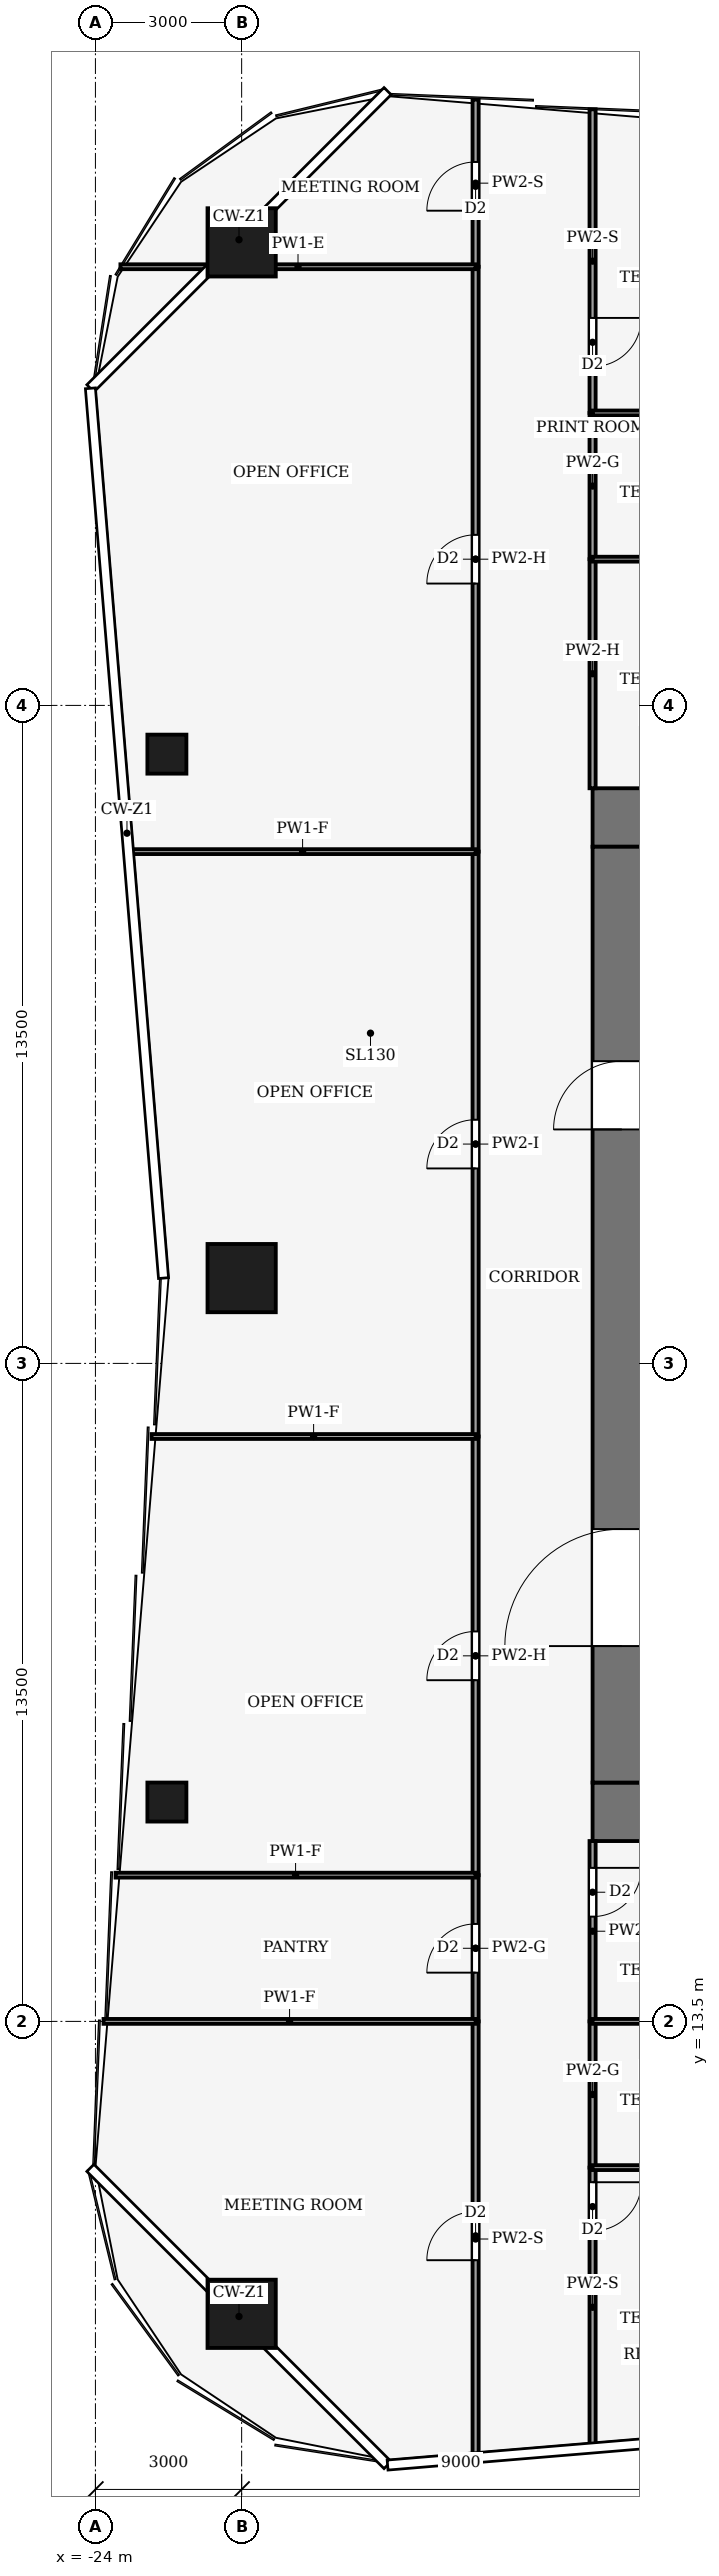
"""IFC4 building model, lengths in metres.
Left out: names, types, materials, properties, quantities, classifications, styles, units other than length and angle.
Written with IfcOpenShell. Run it as: python <this file> out.ifc"""

import sys

from ifc_helpers import new_model, si_unit, direction, frame, frame_2d, origin, origin_2d, place, context, subcontext, project, spatial, rectangle, hollow_rectangle, extrude, element, fill, save


model = new_model("IFC4")
c1 = context("Model", 3, precision=1e-05, world=origin(), true_north=direction((0.0, 1.0)))
c2 = subcontext(c1, "Body", "Model", "MODEL_VIEW")
j1 = project(units=[si_unit("LENGTHUNIT", "METRE"), si_unit("PLANEANGLEUNIT", "RADIAN")], contexts=[c1])
p1 = place(None, origin())
s1 = spatial("IfcSite", under=j1, at=p1, CompositionType="ELEMENT")
p2 = place(p1, origin())
s2 = spatial("IfcBuilding", under=s1, at=p2, CompositionType="ELEMENT")
p3 = place(p2, frame((0.0, 0.0, 86.0)))
s3 = spatial("IfcBuildingStorey", under=s2, at=p3, CompositionType="ELEMENT", Elevation=86.0)
for number, where, z_axis, x_axis in (
    (1, (-13.8, 17.8, -0.13), (0.0, 0.0, 1.0), (1.0, 0.0, 0.0)),
    (2, (-13.8, 38.2, -0.13), (0.0, 0.0, 1.0), (1.0, 0.0, 0.0)),
):
    element("IfcWall", number, at=place(p3, frame(where, z_axis=z_axis, x_axis=x_axis)), inside=s3, PredefinedType="SHEAR", context=c2, shape_type="SweptSolid", body=[
        extrude(rectangle(XDim=27.6, YDim=1.2, at=frame_2d((13.8, 0.0))), origin(), (0.0, 0.0, 1.0), 4.0),
    ])
p4 = place(p3, frame((-13.2, 18.4, -0.13), z_axis=(0.0, 0.0, 1.0), x_axis=(0.0, 1.0, 0.0)))
e3 = element("IfcWall", 3, at=p4, inside=s3, PredefinedType="SHEAR", context=c2, shape_type="SweptSolid", body=[
    extrude(rectangle(XDim=19.2, YDim=1.2, at=frame_2d((9.6, 0.0))), origin(), (0.0, 0.0, 1.0), 4.0),
])
p5 = place(p4, frame((2.8, 0.0, 0.13)))
e4 = element("IfcOpeningElement", 4, at=p5, cuts=e3, PredefinedType="OPENING", context=c2, shape_type="SweptSolid", body=[
    extrude(rectangle(XDim=2.4, YDim=2.4, at=frame_2d((1.2, 1.2))), frame((0.0, 0.61, 0.0), z_axis=(0.0, -1.0, 0.0), x_axis=(1.0, 0.0, 0.0)), (0.0, 0.0, 1.0), 1.22),
])
p6 = place(p4, frame((13.4, 0.0, 0.13)))
e5 = element("IfcOpeningElement", 5, at=p6, cuts=e3, PredefinedType="OPENING", context=c2, shape_type="SweptSolid", body=[
    extrude(rectangle(XDim=1.4, YDim=2.2, at=frame_2d((0.7, 1.1))), frame((0.0, 0.61, 0.0), z_axis=(0.0, -1.0, 0.0), x_axis=(1.0, 0.0, 0.0)), (0.0, 0.0, 1.0), 1.22),
])
for number, where, z_axis, x_axis in (
    (6, (-21.0, 50.0, 0.0), (0.0, 0.0, 1.0), (1.0, 0.0, 0.0)),
    (7, (-21.0, 7.5, 0.0), (0.0, 0.0, 1.0), (1.0, 0.0, 0.0)),
    (8, (-21.0, 28.75, 0.0), (0.0, 0.0, 1.0), (1.0, 0.0, 0.0)),
):
    element("IfcColumn", number, at=place(p3, frame(where, z_axis=z_axis, x_axis=x_axis)), inside=s3, PredefinedType="COLUMN", context=c2, shape_type="SweptSolid", body=[
        extrude(hollow_rectangle(XDim=1.4, YDim=1.4, WallThickness=0.08, at=origin_2d()), origin(), (0.0, 0.0, 1.0), 4.0),
    ])
for number, where, z_axis, x_axis in (
    (9, (-22.534, 18.0, 0.0), (0.0, 0.0, 1.0), (1.0, 0.0, 0.0)),
    (10, (-22.534, 39.5, 0.0), (0.0, 0.0, 1.0), (1.0, 0.0, 0.0)),
):
    element("IfcColumn", number, at=place(p3, frame(where, z_axis=z_axis, x_axis=x_axis)), inside=s3, PredefinedType="COLUMN", context=c2, shape_type="SweptSolid", body=[
        extrude(hollow_rectangle(XDim=0.8, YDim=0.8, WallThickness=0.04, at=origin_2d()), origin(), (0.0, 0.0, 1.0), 4.0),
    ])
p7 = place(p3, frame((-16.2, 4.57, 0.0), z_axis=(0.0, 0.0, 1.0), x_axis=(0.0, 1.0, 0.0)))
e11 = element("IfcWall", 11, at=p7, inside=s3, PredefinedType="PARTITIONING", context=c2, shape_type="SweptSolid", body=[
    extrude(rectangle(XDim=8.93, YDim=0.125, at=frame_2d((4.465, 0.0))), origin(), (0.0, 0.0, 1.0), 3.04),
])
p8 = place(p7, frame((4.03, 0.0, 0.0)))
e12 = element("IfcOpeningElement", 12, at=p8, cuts=e11, PredefinedType="OPENING", context=c2, shape_type="SweptSolid", body=[
    extrude(rectangle(XDim=1.0, YDim=2.1, at=frame_2d((0.5, 1.05))), frame((0.0, 0.073, 0.0), z_axis=(0.0, -1.0, 0.0), x_axis=(1.0, 0.0, 0.0)), (0.0, 0.0, 1.0), 0.145),
])
p9 = place(p3, frame((-16.2, 13.5, 0.0), z_axis=(0.0, 0.0, 1.0), x_axis=(0.0, 1.0, 0.0)))
e13 = element("IfcWall", 13, at=p9, inside=s3, PredefinedType="PARTITIONING", context=c2, shape_type="SweptSolid", body=[
    extrude(rectangle(XDim=3.0, YDim=0.125, at=frame_2d((1.5, 0.0))), origin(), (0.0, 0.0, 1.0), 3.87),
])
p10 = place(p9, frame((1.0, 0.0, 0.0)))
e14 = element("IfcOpeningElement", 14, at=p10, cuts=e13, PredefinedType="OPENING", context=c2, shape_type="SweptSolid", body=[
    extrude(rectangle(XDim=1.0, YDim=2.1, at=frame_2d((0.5, 1.05))), frame((0.0, 0.073, 0.0), z_axis=(0.0, -1.0, 0.0), x_axis=(1.0, 0.0, 0.0)), (0.0, 0.0, 1.0), 0.145),
])
p11 = place(p3, frame((-16.2, 16.5, 0.0), z_axis=(0.0, 0.0, 1.0), x_axis=(0.0, 1.0, 0.0)))
e15 = element("IfcWall", 15, at=p11, inside=s3, PredefinedType="PARTITIONING", context=c2, shape_type="SweptSolid", body=[
    extrude(rectangle(XDim=9.0, YDim=0.125, at=frame_2d((4.5, 0.0))), origin(), (0.0, 0.0, 1.0), 3.14),
])
p12 = place(p11, frame((4.0, 0.0, 0.0)))
e16 = element("IfcOpeningElement", 16, at=p12, cuts=e15, PredefinedType="OPENING", context=c2, shape_type="SweptSolid", body=[
    extrude(rectangle(XDim=1.0, YDim=2.1, at=frame_2d((0.5, 1.05))), frame((0.0, 0.073, 0.0), z_axis=(0.0, -1.0, 0.0), x_axis=(1.0, 0.0, 0.0)), (0.0, 0.0, 1.0), 0.145),
])
p13 = place(p3, frame((-16.2, 25.5, 0.0), z_axis=(0.0, 0.0, 1.0), x_axis=(0.0, 1.0, 0.0)))
e17 = element("IfcWall", 17, at=p13, inside=s3, PredefinedType="PARTITIONING", context=c2, shape_type="SweptSolid", body=[
    extrude(rectangle(XDim=12.0, YDim=0.125, at=frame_2d((6.0, 0.0))), origin(), (0.0, 0.0, 1.0), 3.48),
])
p14 = place(p13, frame((5.5, 0.0, 0.0)))
e18 = element("IfcOpeningElement", 18, at=p14, cuts=e17, PredefinedType="OPENING", context=c2, shape_type="SweptSolid", body=[
    extrude(rectangle(XDim=1.0, YDim=2.1, at=frame_2d((0.5, 1.05))), frame((0.0, 0.073, 0.0), z_axis=(0.0, -1.0, 0.0), x_axis=(1.0, 0.0, 0.0)), (0.0, 0.0, 1.0), 0.145),
])
p15 = place(p3, frame((-16.2, 37.5, 0.0), z_axis=(0.0, 0.0, 1.0), x_axis=(0.0, 1.0, 0.0)))
e19 = element("IfcWall", 19, at=p15, inside=s3, PredefinedType="PARTITIONING", context=c2, shape_type="SweptSolid", body=[
    extrude(rectangle(XDim=12.0, YDim=0.125, at=frame_2d((6.0, 0.0))), origin(), (0.0, 0.0, 1.0), 3.14),
])
p16 = place(p15, frame((5.5, 0.0, 0.0)))
e20 = element("IfcOpeningElement", 20, at=p16, cuts=e19, PredefinedType="OPENING", context=c2, shape_type="SweptSolid", body=[
    extrude(rectangle(XDim=1.0, YDim=2.1, at=frame_2d((0.5, 1.05))), frame((0.0, 0.073, 0.0), z_axis=(0.0, -1.0, 0.0), x_axis=(1.0, 0.0, 0.0)), (0.0, 0.0, 1.0), 0.145),
])
p17 = place(p3, frame((-16.2, 49.5, 0.0), z_axis=(0.0, 0.0, 1.0), x_axis=(0.0, 1.0, 0.0)))
e21 = element("IfcWall", 21, at=p17, inside=s3, PredefinedType="PARTITIONING", context=c2, shape_type="SweptSolid", body=[
    extrude(rectangle(XDim=3.43, YDim=0.125, at=frame_2d((1.715, 0.0))), origin(), (0.0, 0.0, 1.0), 3.04),
])
p18 = place(p17, frame((1.15, 0.0, 0.0)))
e22 = element("IfcOpeningElement", 22, at=p18, cuts=e21, PredefinedType="OPENING", context=c2, shape_type="SweptSolid", body=[
    extrude(rectangle(XDim=1.0, YDim=2.1, at=frame_2d((0.5, 1.05))), frame((0.0, 0.073, 0.0), z_axis=(0.0, -1.0, 0.0), x_axis=(1.0, 0.0, 0.0)), (0.0, 0.0, 1.0), 0.145),
])
p19 = place(p3, frame((-13.8, 10.5, 0.0), z_axis=(0.0, 0.0, 1.0), x_axis=(0.0, -1.0, 0.0)))
e23 = element("IfcWall", 23, at=p19, inside=s3, PredefinedType="PARTITIONING", context=c2, shape_type="SweptSolid", body=[
    extrude(rectangle(XDim=5.73, YDim=0.125, at=frame_2d((2.865, 0.0))), origin(), (0.0, 0.0, 1.0), 3.04),
])
p20 = place(p19, frame((0.3, 0.0, 0.0)))
e24 = element("IfcOpeningElement", 24, at=p20, cuts=e23, PredefinedType="OPENING", context=c2, shape_type="SweptSolid", body=[
    extrude(rectangle(XDim=1.0, YDim=2.1, at=frame_2d((0.5, 1.05))), frame((0.0, 0.073, 0.0), z_axis=(0.0, -1.0, 0.0), x_axis=(1.0, 0.0, 0.0)), (0.0, 0.0, 1.0), 0.145),
])
p21 = place(p3, frame((-13.8, 10.5, 0.0), z_axis=(0.0, 0.0, 1.0), x_axis=(0.0, 1.0, 0.0)))
e25 = element("IfcWall", 25, at=p21, inside=s3, PredefinedType="PARTITIONING", context=c2, shape_type="SweptSolid", body=[
    extrude(rectangle(XDim=3.0, YDim=0.125, at=frame_2d((1.5, 0.0))), origin(), (0.0, 0.0, 1.0), 3.87),
])
p22 = place(p3, frame((-13.8, 17.2, 0.0), z_axis=(0.0, 0.0, 1.0), x_axis=(0.0, -1.0, 0.0)))
e26 = element("IfcWall", 26, at=p22, inside=s3, PredefinedType="PARTITIONING", context=c2, shape_type="SweptSolid", body=[
    extrude(rectangle(XDim=3.7, YDim=0.125, at=frame_2d((1.85, 0.0))), origin(), (0.0, 0.0, 1.0), 3.14),
])
p23 = place(p22, frame((0.55, 0.0, 0.0)))
e27 = element("IfcOpeningElement", 27, at=p23, cuts=e26, PredefinedType="OPENING", context=c2, shape_type="SweptSolid", body=[
    extrude(rectangle(XDim=1.0, YDim=2.1, at=frame_2d((0.5, 1.05))), frame((0.0, 0.073, 0.0), z_axis=(0.0, -1.0, 0.0), x_axis=(1.0, 0.0, 0.0)), (0.0, 0.0, 1.0), 0.145),
])
p24 = place(p3, frame((-13.8, 38.8, 0.0), z_axis=(0.0, 0.0, 1.0), x_axis=(0.0, 1.0, 0.0)))
e28 = element("IfcWall", 28, at=p24, inside=s3, PredefinedType="PARTITIONING", context=c2, shape_type="SweptSolid", body=[
    extrude(rectangle(XDim=4.7, YDim=0.125, at=frame_2d((2.35, 0.0))), origin(), (0.0, 0.0, 1.0), 3.14),
])
p25 = place(p3, frame((-13.8, 43.5, 0.0), z_axis=(0.0, 0.0, 1.0), x_axis=(0.0, 1.0, 0.0)))
e29 = element("IfcWall", 29, at=p25, inside=s3, PredefinedType="PARTITIONING", context=c2, shape_type="SweptSolid", body=[
    extrude(rectangle(XDim=3.0, YDim=0.125, at=frame_2d((1.5, 0.0))), origin(), (0.0, 0.0, 1.0), 3.87),
])
p26 = place(p3, frame((-13.8, 52.73, 0.0), z_axis=(0.0, 0.0, 1.0), x_axis=(0.0, -1.0, 0.0)))
e30 = element("IfcWall", 30, at=p26, inside=s3, PredefinedType="PARTITIONING", context=c2, shape_type="SweptSolid", body=[
    extrude(rectangle(XDim=6.23, YDim=0.125, at=frame_2d((3.115, 0.0))), origin(), (0.0, 0.0, 1.0), 3.04),
])
p27 = place(p26, frame((4.28, 0.0, 0.0)))
e31 = element("IfcOpeningElement", 31, at=p27, cuts=e30, PredefinedType="OPENING", context=c2, shape_type="SweptSolid", body=[
    extrude(rectangle(XDim=1.0, YDim=2.1, at=frame_2d((0.5, 1.05))), frame((0.0, 0.073, 0.0), z_axis=(0.0, -1.0, 0.0), x_axis=(1.0, 0.0, 0.0)), (0.0, 0.0, 1.0), 0.145),
])
p28 = place(p3, frame((-16.2, 13.5, 0.0), z_axis=(0.0, 0.0, 1.0), x_axis=(-1.0, 0.0, 0.0)))
e32 = element("IfcWall", 32, at=p28, inside=s3, PredefinedType="PARTITIONING", context=c2, shape_type="SweptSolid", body=[
    extrude(rectangle(XDim=7.634, YDim=0.1, at=frame_2d((3.817, 0.0))), origin(), (0.0, 0.0, 1.0), 3.04),
])
p29 = place(p3, frame((-16.2, 16.5, 0.0), z_axis=(0.0, 0.0, 1.0), x_axis=(-1.0, 0.0, 0.0)))
e33 = element("IfcWall", 33, at=p29, inside=s3, PredefinedType="PARTITIONING", context=c2, shape_type="SweptSolid", body=[
    extrude(rectangle(XDim=7.387, YDim=0.1, at=frame_2d((3.693, 0.0))), origin(), (0.0, 0.0, 1.0), 3.04),
])
p30 = place(p3, frame((-16.2, 25.5, 0.0), z_axis=(0.0, 0.0, 1.0), x_axis=(-1.0, 0.0, 0.0)))
e34 = element("IfcWall", 34, at=p30, inside=s3, PredefinedType="PARTITIONING", context=c2, shape_type="SweptSolid", body=[
    extrude(rectangle(XDim=6.647, YDim=0.1, at=frame_2d((3.324, 0.0))), origin(), (0.0, 0.0, 1.0), 3.04),
])
p31 = place(p3, frame((-16.2, 37.5, 0.0), z_axis=(0.0, 0.0, 1.0), x_axis=(-1.0, 0.0, 0.0)))
e35 = element("IfcWall", 35, at=p31, inside=s3, PredefinedType="PARTITIONING", context=c2, shape_type="SweptSolid", body=[
    extrude(rectangle(XDim=7.099, YDim=0.1, at=frame_2d((3.55, 0.0))), origin(), (0.0, 0.0, 1.0), 3.04),
])
p32 = place(p3, frame((-16.2, 49.5, 0.0), z_axis=(0.0, 0.0, 1.0), x_axis=(-1.0, 0.0, 0.0)))
e36 = element("IfcWall", 36, at=p32, inside=s3, PredefinedType="PARTITIONING", context=c2, shape_type="SweptSolid", body=[
    extrude(rectangle(XDim=7.287, YDim=0.1, at=frame_2d((3.644, 0.0))), origin(), (0.0, 0.0, 1.0), 3.34),
])
p33 = place(p3, frame((-13.8, 10.5, 0.0), z_axis=(0.0, 0.0, 1.0), x_axis=(1.0, 0.0, 0.0)))
e37 = element("IfcWall", 37, at=p33, inside=s3, PredefinedType="PARTITIONING", context=c2, shape_type="SweptSolid", body=[
    extrude(rectangle(XDim=3.3, YDim=0.1, at=frame_2d((1.65, 0.0))), origin(), (0.0, 0.0, 1.0), 3.44),
])
p34 = place(p33, frame((1.95, 0.0, 0.0)))
e38 = element("IfcOpeningElement", 38, at=p34, cuts=e37, PredefinedType="OPENING", context=c2, shape_type="SweptSolid", body=[
    extrude(rectangle(XDim=1.0, YDim=2.1, at=frame_2d((0.5, 1.05))), frame((0.0, 0.06, 0.0), z_axis=(0.0, -1.0, 0.0), x_axis=(1.0, 0.0, 0.0)), (0.0, 0.0, 1.0), 0.12),
])
p35 = place(p3, frame((-10.5, 13.5, 0.0), z_axis=(0.0, 0.0, 1.0), x_axis=(-1.0, 0.0, 0.0)))
e39 = element("IfcWall", 39, at=p35, inside=s3, PredefinedType="PARTITIONING", context=c2, shape_type="SweptSolid", body=[
    extrude(rectangle(XDim=3.3, YDim=0.1, at=frame_2d((1.65, 0.0))), origin(), (0.0, 0.0, 1.0), 3.44),
])
p36 = place(p3, frame((-10.5, 43.5, 0.0), z_axis=(0.0, 0.0, 1.0), x_axis=(-1.0, 0.0, 0.0)))
e40 = element("IfcWall", 40, at=p36, inside=s3, PredefinedType="PARTITIONING", context=c2, shape_type="SweptSolid", body=[
    extrude(rectangle(XDim=3.3, YDim=0.1, at=frame_2d((1.65, 0.0))), origin(), (0.0, 0.0, 1.0), 3.39),
])
p37 = place(p36, frame((1.15, 0.0, 0.0)))
e41 = element("IfcOpeningElement", 41, at=p37, cuts=e40, PredefinedType="OPENING", context=c2, shape_type="SweptSolid", body=[
    extrude(rectangle(XDim=1.0, YDim=2.1, at=frame_2d((0.5, 1.05))), frame((0.0, 0.06, 0.0), z_axis=(0.0, -1.0, 0.0), x_axis=(1.0, 0.0, 0.0)), (0.0, 0.0, 1.0), 0.12),
])
p38 = place(p3, frame((-10.5, 46.5, 0.0), z_axis=(0.0, 0.0, 1.0), x_axis=(-1.0, 0.0, 0.0)))
e42 = element("IfcWall", 42, at=p38, inside=s3, PredefinedType="PARTITIONING", context=c2, shape_type="SweptSolid", body=[
    extrude(rectangle(XDim=3.3, YDim=0.1, at=frame_2d((1.65, 0.0))), origin(), (0.0, 0.0, 1.0), 3.39),
])
p39 = place(p38, frame((0.35, 0.0, 0.0)))
e43 = element("IfcOpeningElement", 43, at=p39, cuts=e42, PredefinedType="OPENING", context=c2, shape_type="SweptSolid", body=[
    extrude(rectangle(XDim=1.0, YDim=2.1, at=frame_2d((0.5, 1.05))), frame((0.0, 0.06, 0.0), z_axis=(0.0, -1.0, 0.0), x_axis=(1.0, 0.0, 0.0)), (0.0, 0.0, 1.0), 0.12),
])
p40 = place(p5, origin())
e44 = element("IfcDoor", 44, at=p40, inside=s3, OperationType="DOUBLE_DOOR_SINGLE_SWING", PredefinedType="DOOR", context=c2, shape_type="SweptSolid", body=[
    extrude(rectangle(XDim=2.4, YDim=2.4, at=frame_2d((1.2, 1.2))), frame((0.0, 0.025, 0.0), z_axis=(0.0, -1.0, 0.0), x_axis=(1.0, 0.0, 0.0)), (0.0, 0.0, 1.0), 0.05),
])
fill(e4, e44)
p41 = place(p6, origin())
e45 = element("IfcDoor", 45, at=p41, inside=s3, OperationType="SINGLE_SWING_RIGHT", PredefinedType="DOOR", context=c2, shape_type="SweptSolid", body=[
    extrude(rectangle(XDim=1.4, YDim=2.2, at=frame_2d((0.7, 1.1))), frame((0.0, 0.025, 0.0), z_axis=(0.0, -1.0, 0.0), x_axis=(1.0, 0.0, 0.0)), (0.0, 0.0, 1.0), 0.05),
])
fill(e5, e45)
p42 = place(p8, origin())
e46 = element("IfcDoor", 46, at=p42, inside=s3, OperationType="SINGLE_SWING_RIGHT", PredefinedType="DOOR", context=c2, shape_type="SweptSolid", body=[
    extrude(rectangle(XDim=1.0, YDim=2.1, at=frame_2d((0.5, 1.05))), frame((0.0, 0.025, 0.0), z_axis=(0.0, -1.0, 0.0), x_axis=(1.0, 0.0, 0.0)), (0.0, 0.0, 1.0), 0.05),
])
fill(e12, e46)
p43 = place(p10, origin())
e47 = element("IfcDoor", 47, at=p43, inside=s3, OperationType="SINGLE_SWING_RIGHT", PredefinedType="DOOR", context=c2, shape_type="SweptSolid", body=[
    extrude(rectangle(XDim=1.0, YDim=2.1, at=frame_2d((0.5, 1.05))), frame((0.0, 0.025, 0.0), z_axis=(0.0, -1.0, 0.0), x_axis=(1.0, 0.0, 0.0)), (0.0, 0.0, 1.0), 0.05),
])
fill(e14, e47)
p44 = place(p12, origin())
e48 = element("IfcDoor", 48, at=p44, inside=s3, OperationType="SINGLE_SWING_LEFT", PredefinedType="DOOR", context=c2, shape_type="SweptSolid", body=[
    extrude(rectangle(XDim=1.0, YDim=2.1, at=frame_2d((0.5, 1.05))), frame((0.0, 0.025, 0.0), z_axis=(0.0, -1.0, 0.0), x_axis=(1.0, 0.0, 0.0)), (0.0, 0.0, 1.0), 0.05),
])
fill(e16, e48)
p45 = place(p14, origin())
e49 = element("IfcDoor", 49, at=p45, inside=s3, OperationType="SINGLE_SWING_RIGHT", PredefinedType="DOOR", context=c2, shape_type="SweptSolid", body=[
    extrude(rectangle(XDim=1.0, YDim=2.1, at=frame_2d((0.5, 1.05))), frame((0.0, 0.025, 0.0), z_axis=(0.0, -1.0, 0.0), x_axis=(1.0, 0.0, 0.0)), (0.0, 0.0, 1.0), 0.05),
])
fill(e18, e49)
p46 = place(p16, origin())
e50 = element("IfcDoor", 50, at=p46, inside=s3, OperationType="SINGLE_SWING_LEFT", PredefinedType="DOOR", context=c2, shape_type="SweptSolid", body=[
    extrude(rectangle(XDim=1.0, YDim=2.1, at=frame_2d((0.5, 1.05))), frame((0.0, 0.025, 0.0), z_axis=(0.0, -1.0, 0.0), x_axis=(1.0, 0.0, 0.0)), (0.0, 0.0, 1.0), 0.05),
])
fill(e20, e50)
p47 = place(p18, origin())
e51 = element("IfcDoor", 51, at=p47, inside=s3, OperationType="SINGLE_SWING_LEFT", PredefinedType="DOOR", context=c2, shape_type="SweptSolid", body=[
    extrude(rectangle(XDim=1.0, YDim=2.1, at=frame_2d((0.5, 1.05))), frame((0.0, 0.025, 0.0), z_axis=(0.0, -1.0, 0.0), x_axis=(1.0, 0.0, 0.0)), (0.0, 0.0, 1.0), 0.05),
])
fill(e22, e51)
p48 = place(p20, origin())
e52 = element("IfcDoor", 52, at=p48, inside=s3, OperationType="SINGLE_SWING_LEFT", PredefinedType="DOOR", context=c2, shape_type="SweptSolid", body=[
    extrude(rectangle(XDim=1.0, YDim=2.1, at=frame_2d((0.5, 1.05))), frame((0.0, 0.025, 0.0), z_axis=(0.0, -1.0, 0.0), x_axis=(1.0, 0.0, 0.0)), (0.0, 0.0, 1.0), 0.05),
])
fill(e24, e52)
p49 = place(p23, origin())
e53 = element("IfcDoor", 53, at=p49, inside=s3, OperationType="SINGLE_SWING_LEFT", PredefinedType="DOOR", context=c2, shape_type="SweptSolid", body=[
    extrude(rectangle(XDim=1.0, YDim=2.1, at=frame_2d((0.5, 1.05))), frame((0.0, 0.025, 0.0), z_axis=(0.0, -1.0, 0.0), x_axis=(1.0, 0.0, 0.0)), (0.0, 0.0, 1.0), 0.05),
])
fill(e27, e53)
p50 = place(p27, origin())
e54 = element("IfcDoor", 54, at=p50, inside=s3, OperationType="SINGLE_SWING_RIGHT", PredefinedType="DOOR", context=c2, shape_type="SweptSolid", body=[
    extrude(rectangle(XDim=1.0, YDim=2.1, at=frame_2d((0.5, 1.05))), frame((0.0, 0.025, 0.0), z_axis=(0.0, -1.0, 0.0), x_axis=(1.0, 0.0, 0.0)), (0.0, 0.0, 1.0), 0.05),
])
fill(e31, e54)
save(model, sys.argv[1])
